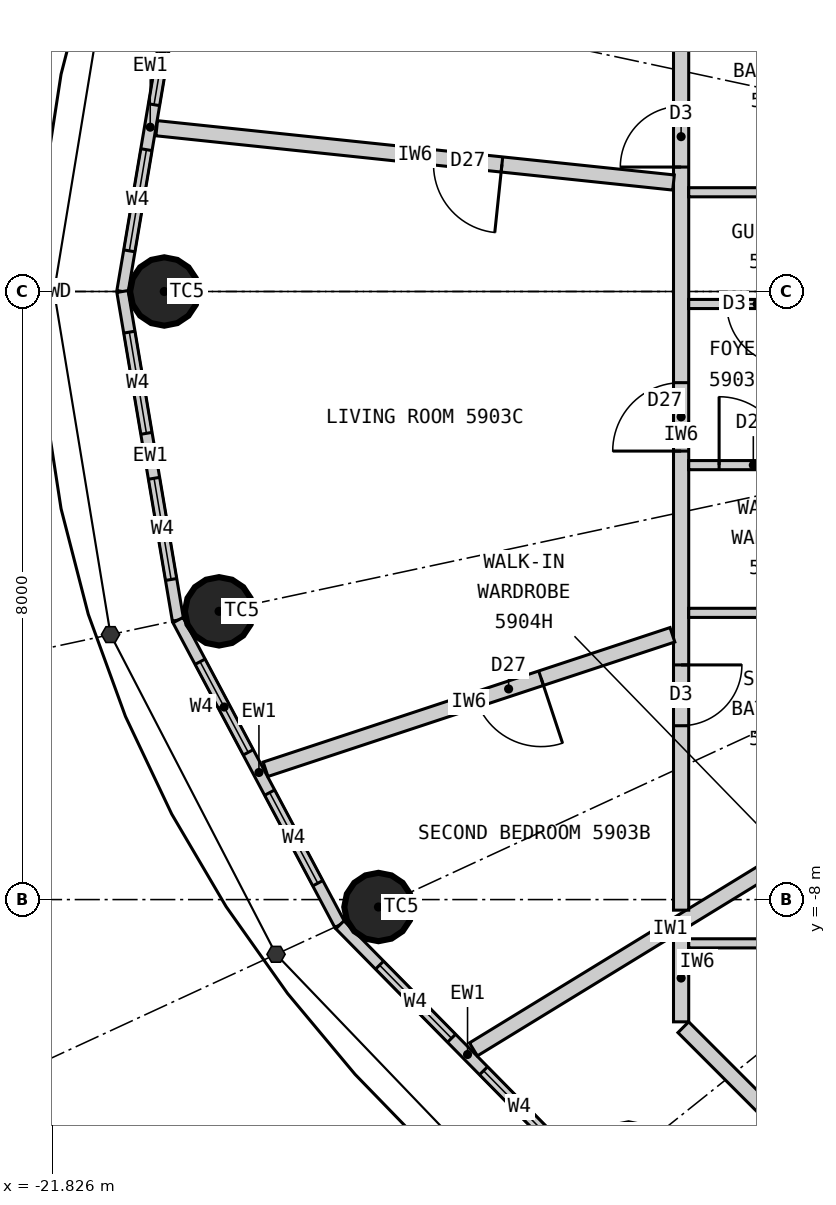
"""IFC4 building model, lengths in metres.
Left out: names, types, materials, properties, quantities, classifications, styles, units other than length and angle.
Written with IfcOpenShell. Run it as: python <this file> out.ifc"""

import sys

from ifc_helpers import new_model, si_unit, direction, frame, frame_2d, origin, origin_2d, place, context, subcontext, project, spatial, rectangle, circle, extrude, element, fill, save


model = new_model("IFC4")
c1 = context("Model", 3, precision=1e-05, world=origin(), true_north=direction((0.0, 1.0)))
c2 = subcontext(c1, "Body", "Model", "MODEL_VIEW")
j1 = project(units=[si_unit("LENGTHUNIT", "METRE"), si_unit("PLANEANGLEUNIT", "RADIAN")], contexts=[c1])
p1 = place(None, origin())
s1 = spatial("IfcSite", under=j1, at=p1, CompositionType="ELEMENT")
p2 = place(p1, origin())
s2 = spatial("IfcBuilding", under=s1, at=p2, CompositionType="ELEMENT")
p3 = place(p2, frame((0.0, 0.0, 219.3)))
s3 = spatial("IfcBuildingStorey", under=s2, at=p3, CompositionType="ELEMENT", Elevation=219.3)
for number, where, z_axis, x_axis in (
    (1, (-20.35, 0.0, 0.0), (0.0, 0.0, 1.0), (1.0, 0.0, 0.0)),
    (2, (-19.629, -4.208, 0.0), (0.0, 0.0, 1.0), (1.0, 0.0, 0.0)),
    (3, (-17.532, -8.098, 0.0), (0.0, 0.0, 1.0), (1.0, 0.0, 0.0)),
    (4, (-14.241, -11.393, 0.0), (0.0, 0.0, 1.0), (1.0, 0.0, 0.0)),
):
    element("IfcColumn", number, at=place(p3, frame(where, z_axis=z_axis, x_axis=x_axis)), inside=s3, PredefinedType="COLUMN", context=c2, shape_type="SweptSolid", body=[
        extrude(circle(Radius=0.45, at=origin_2d()), origin(), (0.0, 0.0, 1.0), 3.3),
    ])
p4 = place(p3, frame((-20.17, 4.323, 0.0), z_axis=(0.0, 0.0, 1.0), x_axis=(-0.166538513568, -0.986034950445, 0.0)))
e5 = element("IfcWall", 5, at=p4, inside=s3, PredefinedType="ELEMENTEDWALL", context=c2, shape_type="SweptSolid", body=[
    extrude(rectangle(XDim=4.385, YDim=0.15, at=frame_2d((2.192, 0.0))), origin(), (0.0, 0.0, 1.0), 3.12),
])
p5 = place(p4, frame((0.542, 0.0, 0.9)))
e6 = element("IfcOpeningElement", 6, at=p5, cuts=e5, PredefinedType="OPENING", context=c2, shape_type="SweptSolid", body=[
    extrude(rectangle(XDim=1.35, YDim=1.9, at=frame_2d((0.675, 0.95))), frame((0.0, 0.085, 0.0), z_axis=(0.0, -1.0, 0.0), x_axis=(1.0, 0.0, 0.0)), (0.0, 0.0, 1.0), 0.17),
])
p6 = place(p4, frame((2.492, 0.0, 0.9)))
e7 = element("IfcOpeningElement", 7, at=p6, cuts=e5, PredefinedType="OPENING", context=c2, shape_type="SweptSolid", body=[
    extrude(rectangle(XDim=1.35, YDim=1.9, at=frame_2d((0.675, 0.95))), frame((0.0, 0.085, 0.0), z_axis=(0.0, -1.0, 0.0), x_axis=(1.0, 0.0, 0.0)), (0.0, 0.0, 1.0), 0.17),
])
p7 = place(p3, frame((-20.9, 0.0, 0.0), z_axis=(0.0, 0.0, 1.0), x_axis=(0.166538513568, -0.986034950445, 0.0)))
e8 = element("IfcWall", 8, at=p7, inside=s3, PredefinedType="ELEMENTEDWALL", context=c2, shape_type="SweptSolid", body=[
    extrude(rectangle(XDim=4.385, YDim=0.15, at=frame_2d((2.192, 0.0))), origin(), (0.0, 0.0, 1.0), 3.12),
])
p8 = place(p7, frame((0.542, 0.0, 0.9)))
e9 = element("IfcOpeningElement", 9, at=p8, cuts=e8, PredefinedType="OPENING", context=c2, shape_type="SweptSolid", body=[
    extrude(rectangle(XDim=1.35, YDim=1.9, at=frame_2d((0.675, 0.95))), frame((0.0, 0.085, 0.0), z_axis=(0.0, -1.0, 0.0), x_axis=(1.0, 0.0, 0.0)), (0.0, 0.0, 1.0), 0.17),
])
p9 = place(p7, frame((2.492, 0.0, 0.9)))
e10 = element("IfcOpeningElement", 10, at=p9, cuts=e8, PredefinedType="OPENING", context=c2, shape_type="SweptSolid", body=[
    extrude(rectangle(XDim=1.35, YDim=1.9, at=frame_2d((0.675, 0.95))), frame((0.0, 0.085, 0.0), z_axis=(0.0, -1.0, 0.0), x_axis=(1.0, 0.0, 0.0)), (0.0, 0.0, 1.0), 0.17),
])
p10 = place(p3, frame((-20.17, -4.323, 0.0), z_axis=(0.0, 0.0, 1.0), x_axis=(0.469256152955, -0.883062094597, 0.0)))
e11 = element("IfcWall", 11, at=p10, inside=s3, PredefinedType="ELEMENTEDWALL", context=c2, shape_type="SweptSolid", body=[
    extrude(rectangle(XDim=4.539, YDim=0.15, at=frame_2d((2.27, 0.0))), origin(), (0.0, 0.0, 1.0), 3.12),
])
p11 = place(p10, frame((0.62, 0.0, 0.9)))
e12 = element("IfcOpeningElement", 12, at=p11, cuts=e11, PredefinedType="OPENING", context=c2, shape_type="SweptSolid", body=[
    extrude(rectangle(XDim=1.35, YDim=1.9, at=frame_2d((0.675, 0.95))), frame((0.0, 0.085, 0.0), z_axis=(0.0, -1.0, 0.0), x_axis=(1.0, 0.0, 0.0)), (0.0, 0.0, 1.0), 0.17),
])
p12 = place(p10, frame((2.57, 0.0, 0.9)))
e13 = element("IfcOpeningElement", 13, at=p12, cuts=e11, PredefinedType="OPENING", context=c2, shape_type="SweptSolid", body=[
    extrude(rectangle(XDim=1.35, YDim=1.9, at=frame_2d((0.675, 0.95))), frame((0.0, 0.085, 0.0), z_axis=(0.0, -1.0, 0.0), x_axis=(1.0, 0.0, 0.0)), (0.0, 0.0, 1.0), 0.17),
])
p13 = place(p3, frame((-18.04, -8.332, 0.0), z_axis=(0.0, 0.0, 1.0), x_axis=(0.701527379618, -0.712642501993, 0.0)))
e14 = element("IfcWall", 14, at=p13, inside=s3, PredefinedType="ELEMENTEDWALL", context=c2, shape_type="SweptSolid", body=[
    extrude(rectangle(XDim=4.788, YDim=0.15, at=frame_2d((2.394, 0.0))), origin(), (0.0, 0.0, 1.0), 3.12),
])
p14 = place(p13, frame((0.744, 0.0, 0.9)))
e15 = element("IfcOpeningElement", 15, at=p14, cuts=e14, PredefinedType="OPENING", context=c2, shape_type="SweptSolid", body=[
    extrude(rectangle(XDim=1.35, YDim=1.9, at=frame_2d((0.675, 0.95))), frame((0.0, 0.085, 0.0), z_axis=(0.0, -1.0, 0.0), x_axis=(1.0, 0.0, 0.0)), (0.0, 0.0, 1.0), 0.17),
])
p15 = place(p13, frame((2.694, 0.0, 0.9)))
e16 = element("IfcOpeningElement", 16, at=p15, cuts=e14, PredefinedType="OPENING", context=c2, shape_type="SweptSolid", body=[
    extrude(rectangle(XDim=1.35, YDim=1.9, at=frame_2d((0.675, 0.95))), frame((0.0, 0.085, 0.0), z_axis=(0.0, -1.0, 0.0), x_axis=(1.0, 0.0, 0.0)), (0.0, 0.0, 1.0), 0.17),
])
p16 = place(p3, frame((-11.1, -6.797, 0.0), z_axis=(0.0, 0.0, 1.0), x_axis=(-0.852799818179, -0.522237943963, 0.0)))
e17 = element("IfcWall", 17, at=p16, inside=s3, PredefinedType="PARTITIONING", context=c2, shape_type="SweptSolid", body=[
    extrude(rectangle(XDim=6.077, YDim=0.2, at=frame_2d((3.039, 0.0))), origin(), (0.0, 0.0, 1.0), 3.12),
])
p17 = place(p3, frame((-13.55, 4.357, 0.0), z_axis=(0.0, 0.0, 1.0), x_axis=(0.0, -1.0, 0.0)))
e18 = element("IfcWall", 18, at=p17, inside=s3, PredefinedType="PARTITIONING", context=c2, shape_type="SweptSolid", body=[
    extrude(rectangle(XDim=12.496, YDim=0.2, at=frame_2d((6.248, 0.0))), origin(), (0.0, 0.0, 1.0), 3.12),
])
p18 = place(p17, frame((1.92, 0.0, 0.0)))
e19 = element("IfcOpeningElement", 19, at=p18, cuts=e18, PredefinedType="OPENING", context=c2, shape_type="SweptSolid", body=[
    extrude(rectangle(XDim=0.8, YDim=2.1, at=frame_2d((0.4, 1.05))), frame((0.0, 0.11, 0.0), z_axis=(0.0, -1.0, 0.0), x_axis=(1.0, 0.0, 0.0)), (0.0, 0.0, 1.0), 0.22),
])
p19 = place(p17, frame((9.27, 0.0, 0.0)))
e20 = element("IfcOpeningElement", 20, at=p19, cuts=e18, PredefinedType="OPENING", context=c2, shape_type="SweptSolid", body=[
    extrude(rectangle(XDim=0.8, YDim=2.1, at=frame_2d((0.4, 1.05))), frame((0.0, 0.11, 0.0), z_axis=(0.0, -1.0, 0.0), x_axis=(1.0, 0.0, 0.0)), (0.0, 0.0, 1.0), 0.22),
])
p20 = place(p17, frame((5.557, 0.0, 0.0)))
e21 = element("IfcOpeningElement", 21, at=p20, cuts=e18, PredefinedType="OPENING", context=c2, shape_type="SweptSolid", body=[
    extrude(rectangle(XDim=0.9, YDim=2.1, at=frame_2d((0.45, 1.05))), frame((0.0, 0.11, 0.0), z_axis=(0.0, -1.0, 0.0), x_axis=(1.0, 0.0, 0.0)), (0.0, 0.0, 1.0), 0.22),
])
p21 = place(p3, frame((-13.65, 1.434, 0.0), z_axis=(0.0, 0.0, 1.0), x_axis=(-0.994526954268, 0.10448031984, 0.0)))
e22 = element("IfcWall", 22, at=p21, inside=s3, PredefinedType="PARTITIONING", context=c2, shape_type="SweptSolid", body=[
    extrude(rectangle(XDim=6.837, YDim=0.2, at=frame_2d((3.418, 0.0))), origin(), (0.0, 0.0, 1.0), 2.47),
])
p22 = place(p21, frame((2.27, 0.0, 0.0)))
e23 = element("IfcOpeningElement", 23, at=p22, cuts=e22, PredefinedType="OPENING", context=c2, shape_type="SweptSolid", body=[
    extrude(rectangle(XDim=0.9, YDim=2.1, at=frame_2d((0.45, 1.05))), frame((0.0, 0.11, 0.0), z_axis=(0.0, -1.0, 0.0), x_axis=(1.0, 0.0, 0.0)), (0.0, 0.0, 1.0), 0.22),
])
p23 = place(p3, frame((-13.664, -4.516, 0.0), z_axis=(0.0, 0.0, 1.0), x_axis=(-0.949481375941, -0.313823384632, 0.0)))
e24 = element("IfcWall", 24, at=p23, inside=s3, PredefinedType="PARTITIONING", context=c2, shape_type="SweptSolid", body=[
    extrude(rectangle(XDim=5.638, YDim=0.2, at=frame_2d((2.819, 0.0))), origin(), (0.0, 0.0, 1.0), 3.12),
])
p24 = place(p23, frame((1.82, 0.0, 0.0)))
e25 = element("IfcOpeningElement", 25, at=p24, cuts=e24, PredefinedType="OPENING", context=c2, shape_type="SweptSolid", body=[
    extrude(rectangle(XDim=0.9, YDim=2.1, at=frame_2d((0.45, 1.05))), frame((0.0, 0.11, 0.0), z_axis=(0.0, -1.0, 0.0), x_axis=(1.0, 0.0, 0.0)), (0.0, 0.0, 1.0), 0.22),
])
p25 = place(p3, frame((-11.1, 1.306, 0.0), z_axis=(0.0, 0.0, 1.0), x_axis=(-1.0, 0.0, 0.0)))
e26 = element("IfcWall", 26, at=p25, inside=s3, PredefinedType="PARTITIONING", context=c2, shape_type="SweptSolid", body=[
    extrude(rectangle(XDim=2.35, YDim=0.12, at=frame_2d((1.175, 0.0))), origin(), (0.0, 0.0, 1.0), 3.12),
])
p26 = place(p3, frame((-11.1, -0.164, 0.0), z_axis=(0.0, 0.0, 1.0), x_axis=(-1.0, 0.0, 0.0)))
e27 = element("IfcWall", 27, at=p26, inside=s3, PredefinedType="PARTITIONING", context=c2, shape_type="SweptSolid", body=[
    extrude(rectangle(XDim=2.35, YDim=0.12, at=frame_2d((1.175, 0.0))), origin(), (0.0, 0.0, 1.0), 3.12),
])
p27 = place(p26, frame((1.05, 0.0, 0.0)))
e28 = element("IfcOpeningElement", 28, at=p27, cuts=e27, PredefinedType="OPENING", context=c2, shape_type="SweptSolid", body=[
    extrude(rectangle(XDim=0.8, YDim=2.1, at=frame_2d((0.4, 1.05))), frame((0.0, 0.07, 0.0), z_axis=(0.0, -1.0, 0.0), x_axis=(1.0, 0.0, 0.0)), (0.0, 0.0, 1.0), 0.14),
])
p28 = place(p3, frame((-11.1, -2.284, 0.0), z_axis=(0.0, 0.0, 1.0), x_axis=(-1.0, 0.0, 0.0)))
e29 = element("IfcWall", 29, at=p28, inside=s3, PredefinedType="PARTITIONING", context=c2, shape_type="SweptSolid", body=[
    extrude(rectangle(XDim=2.35, YDim=0.12, at=frame_2d((1.175, 0.0))), origin(), (0.0, 0.0, 1.0), 3.12),
])
p29 = place(p28, frame((1.05, 0.0, 0.0)))
e30 = element("IfcOpeningElement", 30, at=p29, cuts=e29, PredefinedType="OPENING", context=c2, shape_type="SweptSolid", body=[
    extrude(rectangle(XDim=0.9, YDim=2.1, at=frame_2d((0.45, 1.05))), frame((0.0, 0.07, 0.0), z_axis=(0.0, -1.0, 0.0), x_axis=(1.0, 0.0, 0.0)), (0.0, 0.0, 1.0), 0.14),
])
p30 = place(p3, frame((-11.1, -4.228, 0.0), z_axis=(0.0, 0.0, 1.0), x_axis=(-1.0, 0.0, 0.0)))
e31 = element("IfcWall", 31, at=p30, inside=s3, PredefinedType="PARTITIONING", context=c2, shape_type="SweptSolid", body=[
    extrude(rectangle(XDim=2.35, YDim=0.12, at=frame_2d((1.175, 0.0))), origin(), (0.0, 0.0, 1.0), 3.12),
])
p31 = place(p3, frame((-13.55, -8.456, 0.0), z_axis=(0.0, 0.0, 1.0), x_axis=(0.0, -1.0, 0.0)))
e32 = element("IfcWall", 32, at=p31, inside=s3, PredefinedType="PARTITIONING", context=c2, shape_type="SweptSolid", body=[
    extrude(rectangle(XDim=1.153, YDim=0.2, at=frame_2d((0.576, 0.0))), origin(), (0.0, 0.0, 1.0), 3.12),
])
p32 = place(p3, frame((-13.521, -9.679, 0.0), z_axis=(0.0, 0.0, 1.0), x_axis=(0.707106781187, -0.707106781187, 0.0)))
e33 = element("IfcWall", 33, at=p32, inside=s3, PredefinedType="PARTITIONING", context=c2, shape_type="SweptSolid", body=[
    extrude(rectangle(XDim=4.019, YDim=0.2, at=frame_2d((2.009, 0.0))), origin(), (0.0, 0.0, 1.0), 3.12),
])
p33 = place(p32, frame((1.57, 0.0, 0.0)))
e34 = element("IfcOpeningElement", 34, at=p33, cuts=e33, PredefinedType="OPENING", context=c2, shape_type="SweptSolid", body=[
    extrude(rectangle(XDim=0.9, YDim=2.1, at=frame_2d((0.45, 1.05))), frame((0.0, 0.11, 0.0), z_axis=(0.0, -1.0, 0.0), x_axis=(1.0, 0.0, 0.0)), (0.0, 0.0, 1.0), 0.22),
])
p34 = place(p3, frame((-11.1, -8.576, 0.0), z_axis=(0.0, 0.0, 1.0), x_axis=(-1.0, 0.0, 0.0)))
e35 = element("IfcWall", 35, at=p34, inside=s3, PredefinedType="PARTITIONING", context=c2, shape_type="SweptSolid", body=[
    extrude(rectangle(XDim=2.35, YDim=0.12, at=frame_2d((1.175, 0.0))), origin(), (0.0, 0.0, 1.0), 3.12),
])
p35 = place(p34, frame((0.22, 0.0, 0.0)))
e36 = element("IfcOpeningElement", 36, at=p35, cuts=e35, PredefinedType="OPENING", context=c2, shape_type="SweptSolid", body=[
    extrude(rectangle(XDim=0.9, YDim=2.1, at=frame_2d((0.45, 1.05))), frame((0.0, 0.07, 0.0), z_axis=(0.0, -1.0, 0.0), x_axis=(1.0, 0.0, 0.0)), (0.0, 0.0, 1.0), 0.14),
])
p36 = place(p5, origin())
e37 = element("IfcWindow", 37, at=p36, inside=s3, PartitioningType="SINGLE_PANEL", PredefinedType="WINDOW", context=c2, shape_type="SweptSolid", body=[
    extrude(rectangle(XDim=1.35, YDim=1.9, at=frame_2d((0.675, 0.95))), frame((0.0, 0.03, 0.0), z_axis=(0.0, -1.0, 0.0), x_axis=(1.0, 0.0, 0.0)), (0.0, 0.0, 1.0), 0.06),
])
fill(e6, e37)
p37 = place(p6, origin())
e38 = element("IfcWindow", 38, at=p37, inside=s3, PartitioningType="SINGLE_PANEL", PredefinedType="WINDOW", context=c2, shape_type="SweptSolid", body=[
    extrude(rectangle(XDim=1.35, YDim=1.9, at=frame_2d((0.675, 0.95))), frame((0.0, 0.03, 0.0), z_axis=(0.0, -1.0, 0.0), x_axis=(1.0, 0.0, 0.0)), (0.0, 0.0, 1.0), 0.06),
])
fill(e7, e38)
p38 = place(p8, origin())
e39 = element("IfcWindow", 39, at=p38, inside=s3, PartitioningType="SINGLE_PANEL", PredefinedType="WINDOW", context=c2, shape_type="SweptSolid", body=[
    extrude(rectangle(XDim=1.35, YDim=1.9, at=frame_2d((0.675, 0.95))), frame((0.0, 0.03, 0.0), z_axis=(0.0, -1.0, 0.0), x_axis=(1.0, 0.0, 0.0)), (0.0, 0.0, 1.0), 0.06),
])
fill(e9, e39)
p39 = place(p9, origin())
e40 = element("IfcWindow", 40, at=p39, inside=s3, PartitioningType="SINGLE_PANEL", PredefinedType="WINDOW", context=c2, shape_type="SweptSolid", body=[
    extrude(rectangle(XDim=1.35, YDim=1.9, at=frame_2d((0.675, 0.95))), frame((0.0, 0.03, 0.0), z_axis=(0.0, -1.0, 0.0), x_axis=(1.0, 0.0, 0.0)), (0.0, 0.0, 1.0), 0.06),
])
fill(e10, e40)
p40 = place(p11, origin())
e41 = element("IfcWindow", 41, at=p40, inside=s3, PartitioningType="SINGLE_PANEL", PredefinedType="WINDOW", context=c2, shape_type="SweptSolid", body=[
    extrude(rectangle(XDim=1.35, YDim=1.9, at=frame_2d((0.675, 0.95))), frame((0.0, 0.03, 0.0), z_axis=(0.0, -1.0, 0.0), x_axis=(1.0, 0.0, 0.0)), (0.0, 0.0, 1.0), 0.06),
])
fill(e12, e41)
p41 = place(p12, origin())
e42 = element("IfcWindow", 42, at=p41, inside=s3, PartitioningType="SINGLE_PANEL", PredefinedType="WINDOW", context=c2, shape_type="SweptSolid", body=[
    extrude(rectangle(XDim=1.35, YDim=1.9, at=frame_2d((0.675, 0.95))), frame((0.0, 0.03, 0.0), z_axis=(0.0, -1.0, 0.0), x_axis=(1.0, 0.0, 0.0)), (0.0, 0.0, 1.0), 0.06),
])
fill(e13, e42)
p42 = place(p14, origin())
e43 = element("IfcWindow", 43, at=p42, inside=s3, PartitioningType="SINGLE_PANEL", PredefinedType="WINDOW", context=c2, shape_type="SweptSolid", body=[
    extrude(rectangle(XDim=1.35, YDim=1.9, at=frame_2d((0.675, 0.95))), frame((0.0, 0.03, 0.0), z_axis=(0.0, -1.0, 0.0), x_axis=(1.0, 0.0, 0.0)), (0.0, 0.0, 1.0), 0.06),
])
fill(e15, e43)
p43 = place(p15, origin())
e44 = element("IfcWindow", 44, at=p43, inside=s3, PartitioningType="SINGLE_PANEL", PredefinedType="WINDOW", context=c2, shape_type="SweptSolid", body=[
    extrude(rectangle(XDim=1.35, YDim=1.9, at=frame_2d((0.675, 0.95))), frame((0.0, 0.03, 0.0), z_axis=(0.0, -1.0, 0.0), x_axis=(1.0, 0.0, 0.0)), (0.0, 0.0, 1.0), 0.06),
])
fill(e16, e44)
p44 = place(p18, origin())
e45 = element("IfcDoor", 45, at=p44, inside=s3, OperationType="SINGLE_SWING_RIGHT", PredefinedType="DOOR", context=c2, shape_type="SweptSolid", body=[
    extrude(rectangle(XDim=0.8, YDim=2.1, at=frame_2d((0.4, 1.05))), frame((0.0, 0.025, 0.0), z_axis=(0.0, -1.0, 0.0), x_axis=(1.0, 0.0, 0.0)), (0.0, 0.0, 1.0), 0.05),
])
fill(e19, e45)
p45 = place(p27, origin())
e46 = element("IfcDoor", 46, at=p45, inside=s3, OperationType="SINGLE_SWING_LEFT", PredefinedType="DOOR", context=c2, shape_type="SweptSolid", body=[
    extrude(rectangle(XDim=0.8, YDim=2.1, at=frame_2d((0.4, 1.05))), frame((0.0, 0.025, 0.0), z_axis=(0.0, -1.0, 0.0), x_axis=(1.0, 0.0, 0.0)), (0.0, 0.0, 1.0), 0.05),
])
fill(e28, e46)
p46 = place(p29, origin())
e47 = element("IfcDoor", 47, at=p46, inside=s3, OperationType="SINGLE_SWING_RIGHT", PredefinedType="DOOR", context=c2, shape_type="SweptSolid", body=[
    extrude(rectangle(XDim=0.9, YDim=2.1, at=frame_2d((0.45, 1.05))), frame((0.0, 0.025, 0.0), z_axis=(0.0, -1.0, 0.0), x_axis=(1.0, 0.0, 0.0)), (0.0, 0.0, 1.0), 0.05),
])
fill(e30, e47)
p47 = place(p19, origin())
e48 = element("IfcDoor", 48, at=p47, inside=s3, OperationType="SINGLE_SWING_LEFT", PredefinedType="DOOR", context=c2, shape_type="SweptSolid", body=[
    extrude(rectangle(XDim=0.8, YDim=2.1, at=frame_2d((0.4, 1.05))), frame((0.0, 0.025, 0.0), z_axis=(0.0, -1.0, 0.0), x_axis=(1.0, 0.0, 0.0)), (0.0, 0.0, 1.0), 0.05),
])
fill(e20, e48)
p48 = place(p20, origin())
e49 = element("IfcDoor", 49, at=p48, inside=s3, OperationType="SINGLE_SWING_RIGHT", PredefinedType="DOOR", context=c2, shape_type="SweptSolid", body=[
    extrude(rectangle(XDim=0.9, YDim=2.1, at=frame_2d((0.45, 1.05))), frame((0.0, 0.025, 0.0), z_axis=(0.0, -1.0, 0.0), x_axis=(1.0, 0.0, 0.0)), (0.0, 0.0, 1.0), 0.05),
])
fill(e21, e49)
p49 = place(p22, origin())
e50 = element("IfcDoor", 50, at=p49, inside=s3, OperationType="SINGLE_SWING_LEFT", PredefinedType="DOOR", context=c2, shape_type="SweptSolid", body=[
    extrude(rectangle(XDim=0.9, YDim=2.1, at=frame_2d((0.45, 1.05))), frame((0.0, 0.025, 0.0), z_axis=(0.0, -1.0, 0.0), x_axis=(1.0, 0.0, 0.0)), (0.0, 0.0, 1.0), 0.05),
])
fill(e23, e50)
p50 = place(p24, origin())
e51 = element("IfcDoor", 51, at=p50, inside=s3, OperationType="SINGLE_SWING_LEFT", PredefinedType="DOOR", context=c2, shape_type="SweptSolid", body=[
    extrude(rectangle(XDim=0.9, YDim=2.1, at=frame_2d((0.45, 1.05))), frame((0.0, 0.025, 0.0), z_axis=(0.0, -1.0, 0.0), x_axis=(1.0, 0.0, 0.0)), (0.0, 0.0, 1.0), 0.05),
])
fill(e25, e51)
save(model, sys.argv[1])
